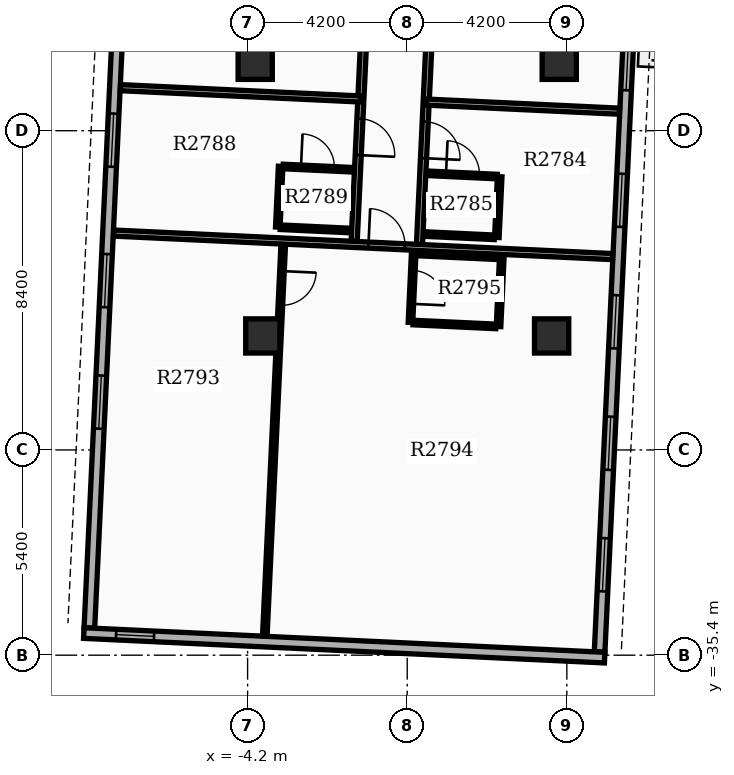
"""IFC4 building model, lengths in metres.
Left out: names, types, materials, properties, quantities, classifications, styles, units other than length and angle.
Written with IfcOpenShell. Run it as: python <this file> out.ifc"""

import sys

from ifc_helpers import new_model, si_unit, direction, frame, frame_2d, origin, origin_2d, place, context, subcontext, project, spatial, rectangle, extrude, element, fill, save


model = new_model("IFC4")
c1 = context("Model", 3, precision=1e-05, world=origin(), true_north=direction((0.0, 1.0)))
c2 = subcontext(c1, "Body", "Model", "MODEL_VIEW")
j1 = project(units=[si_unit("LENGTHUNIT", "METRE"), si_unit("PLANEANGLEUNIT", "RADIAN")], contexts=[c1])
p1 = place(None, origin())
s1 = spatial("IfcSite", under=j1, at=p1, CompositionType="ELEMENT")
p2 = place(p1, origin())
s2 = spatial("IfcBuilding", under=s1, at=p2, CompositionType="ELEMENT")
p3 = place(p2, frame((0.0, 0.0, 172.2)))
s3 = spatial("IfcBuildingStorey", under=s2, at=p3, CompositionType="ELEMENT", Elevation=172.2)
for number, where, z_axis, x_axis in (
    (1, (-4.0, -19.8, 0.0), (0.0, 0.0, 1.0), (1.0, 0.0, 0.0)),
    (2, (4.0, -19.8, 0.0), (0.0, 0.0, 1.0), (1.0, 0.0, 0.0)),
    (3, (-3.8, -27.0, 0.0), (0.0, 0.0, 1.0), (1.0, 0.0, 0.0)),
    (4, (3.8, -27.0, 0.0), (0.0, 0.0, 1.0), (1.0, 0.0, 0.0)),
):
    element("IfcColumn", number, at=place(p3, frame(where, z_axis=z_axis, x_axis=x_axis)), inside=s3, PredefinedType="COLUMN", context=c2, shape_type="SweptSolid", body=[
        extrude(rectangle(XDim=0.9, YDim=0.9, at=origin_2d()), origin(), (0.0, 0.0, 1.0), 3.9),
    ])
p4 = place(p3, frame((-7.416, -14.607, 0.0), z_axis=(0.0, 0.0, 1.0), x_axis=(-0.047103473814, -0.998890015344, 0.0)))
e5 = element("IfcWall", 5, at=p4, inside=s3, PredefinedType="STANDARD", context=c2, shape_type="SweptSolid", body=[
    extrude(rectangle(XDim=20.1, YDim=0.28, at=frame_2d((10.05, 0.0))), origin(), (0.0, 0.0, 1.0), 2.97),
])
p5 = place(p4, frame((1.6, 0.0, 0.8)))
e6 = element("IfcOpeningElement", 6, at=p5, cuts=e5, PredefinedType="OPENING", context=c2, shape_type="SweptSolid", body=[
    extrude(rectangle(XDim=1.4, YDim=1.6, at=frame_2d((0.7, 0.8))), frame((0.0, 0.15, 0.0), z_axis=(0.0, -1.0, 0.0), x_axis=(1.0, 0.0, 0.0)), (0.0, 0.0, 1.0), 0.3),
])
p6 = place(p4, frame((6.55, 0.0, 0.8)))
e7 = element("IfcOpeningElement", 7, at=p6, cuts=e5, PredefinedType="OPENING", context=c2, shape_type="SweptSolid", body=[
    extrude(rectangle(XDim=1.4, YDim=1.6, at=frame_2d((0.7, 0.8))), frame((0.0, 0.15, 0.0), z_axis=(0.0, -1.0, 0.0), x_axis=(1.0, 0.0, 0.0)), (0.0, 0.0, 1.0), 0.3),
])
p7 = place(p4, frame((10.25, 0.0, 0.8)))
e8 = element("IfcOpeningElement", 8, at=p7, cuts=e5, PredefinedType="OPENING", context=c2, shape_type="SweptSolid", body=[
    extrude(rectangle(XDim=1.4, YDim=1.6, at=frame_2d((0.7, 0.8))), frame((0.0, 0.15, 0.0), z_axis=(0.0, -1.0, 0.0), x_axis=(1.0, 0.0, 0.0)), (0.0, 0.0, 1.0), 0.3),
])
p8 = place(p4, frame((13.45, 0.0, 0.8)))
e9 = element("IfcOpeningElement", 9, at=p8, cuts=e5, PredefinedType="OPENING", context=c2, shape_type="SweptSolid", body=[
    extrude(rectangle(XDim=1.4, YDim=1.6, at=frame_2d((0.7, 0.8))), frame((0.0, 0.15, 0.0), z_axis=(0.0, -1.0, 0.0), x_axis=(1.0, 0.0, 0.0)), (0.0, 0.0, 1.0), 0.3),
])
p9 = place(p3, frame((5.062, -35.318, 0.0), z_axis=(0.0, 0.0, 1.0), x_axis=(0.047103473814, 0.998890015344, 0.0)))
e10 = element("IfcWall", 10, at=p9, inside=s3, PredefinedType="STANDARD", context=c2, shape_type="SweptSolid", body=[
    extrude(rectangle(XDim=20.1, YDim=0.28, at=frame_2d((10.05, 0.0))), origin(), (0.0, 0.0, 1.0), 2.97),
])
p10 = place(p9, frame((1.6, 0.0, 0.8)))
e11 = element("IfcOpeningElement", 11, at=p10, cuts=e10, PredefinedType="OPENING", context=c2, shape_type="SweptSolid", body=[
    extrude(rectangle(XDim=1.4, YDim=1.6, at=frame_2d((0.7, 0.8))), frame((0.0, 0.15, 0.0), z_axis=(0.0, -1.0, 0.0), x_axis=(1.0, 0.0, 0.0)), (0.0, 0.0, 1.0), 0.3),
])
p11 = place(p9, frame((4.8, 0.0, 0.8)))
e12 = element("IfcOpeningElement", 12, at=p11, cuts=e10, PredefinedType="OPENING", context=c2, shape_type="SweptSolid", body=[
    extrude(rectangle(XDim=1.4, YDim=1.6, at=frame_2d((0.7, 0.8))), frame((0.0, 0.15, 0.0), z_axis=(0.0, -1.0, 0.0), x_axis=(1.0, 0.0, 0.0)), (0.0, 0.0, 1.0), 0.3),
])
p12 = place(p9, frame((8.0, 0.0, 0.8)))
e13 = element("IfcOpeningElement", 13, at=p12, cuts=e10, PredefinedType="OPENING", context=c2, shape_type="SweptSolid", body=[
    extrude(rectangle(XDim=1.4, YDim=1.6, at=frame_2d((0.7, 0.8))), frame((0.0, 0.15, 0.0), z_axis=(0.0, -1.0, 0.0), x_axis=(1.0, 0.0, 0.0)), (0.0, 0.0, 1.0), 0.3),
])
p13 = place(p9, frame((11.2, 0.0, 0.8)))
e14 = element("IfcOpeningElement", 14, at=p13, cuts=e10, PredefinedType="OPENING", context=c2, shape_type="SweptSolid", body=[
    extrude(rectangle(XDim=1.4, YDim=1.6, at=frame_2d((0.7, 0.8))), frame((0.0, 0.15, 0.0), z_axis=(0.0, -1.0, 0.0), x_axis=(1.0, 0.0, 0.0)), (0.0, 0.0, 1.0), 0.3),
])
p14 = place(p9, frame((14.799, 0.0, 0.85)))
e15 = element("IfcOpeningElement", 15, at=p14, cuts=e10, PredefinedType="OPENING", context=c2, shape_type="SweptSolid", body=[
    extrude(rectangle(XDim=1.2, YDim=1.6, at=frame_2d((0.6, 0.8))), frame((0.0, 0.15, 0.0), z_axis=(0.0, -1.0, 0.0), x_axis=(1.0, 0.0, 0.0)), (0.0, 0.0, 1.0), 0.3),
])
p15 = place(p3, frame((-8.51, -34.818, 0.0), z_axis=(0.0, 0.0, 1.0), x_axis=(0.998890092147, -0.047101845086, 0.0)))
e16 = element("IfcWall", 16, at=p15, inside=s3, PredefinedType="STANDARD", context=c2, shape_type="SweptSolid", body=[
    extrude(rectangle(XDim=13.72, YDim=0.28, at=frame_2d((6.86, 0.0))), origin(), (0.0, 0.0, 1.0), 2.97),
])
p16 = place(p15, frame((0.85, 0.0, 0.85)))
e17 = element("IfcOpeningElement", 17, at=p16, cuts=e16, PredefinedType="OPENING", context=c2, shape_type="SweptSolid", body=[
    extrude(rectangle(XDim=1.0, YDim=1.5, at=frame_2d((0.5, 0.75))), frame((0.0, 0.15, 0.0), z_axis=(0.0, -1.0, 0.0), x_axis=(1.0, 0.0, 0.0)), (0.0, 0.0, 1.0), 0.3),
])
p17 = place(p3, frame((0.779, -14.903, 0.0), z_axis=(0.0, 0.0, 1.0), x_axis=(-0.047091598416, -0.998890575268, 0.0)))
e18 = element("IfcWall", 18, at=p17, inside=s3, PredefinedType="PARTITIONING", context=c2, shape_type="SweptSolid", body=[
    extrude(rectangle(XDim=9.7, YDim=0.16, at=frame_2d((4.85, 0.0))), origin(), (0.0, 0.0, 1.0), 2.96),
])
p18 = place(p17, frame((2.575, 0.0, 0.0)))
e19 = element("IfcOpeningElement", 19, at=p18, cuts=e18, PredefinedType="OPENING", context=c2, shape_type="SweptSolid", body=[
    extrude(rectangle(XDim=0.96, YDim=2.15, at=frame_2d((0.48, 1.075))), frame((0.0, 0.09, 0.0), z_axis=(0.0, -1.0, 0.0), x_axis=(1.0, 0.0, 0.0)), (0.0, 0.0, 1.0), 0.18),
])
p19 = place(p17, frame((6.467, 0.0, 0.0)))
e20 = element("IfcOpeningElement", 20, at=p19, cuts=e18, PredefinedType="OPENING", context=c2, shape_type="SweptSolid", body=[
    extrude(rectangle(XDim=0.96, YDim=2.15, at=frame_2d((0.48, 1.075))), frame((0.0, 0.09, 0.0), z_axis=(0.0, -1.0, 0.0), x_axis=(1.0, 0.0, 0.0)), (0.0, 0.0, 1.0), 0.18),
])
p20 = place(p3, frame((0.499, -20.847, 0.0), z_axis=(0.0, 0.0, 1.0), x_axis=(0.998891017342, -0.047082220362, 0.0)))
e21 = element("IfcWall", 21, at=p20, inside=s3, PredefinedType="PARTITIONING", context=c2, shape_type="SweptSolid", body=[
    extrude(rectangle(XDim=5.092, YDim=0.16, at=frame_2d((2.546, 0.0))), origin(), (0.0, 0.0, 1.0), 2.96),
])
p21 = place(p3, frame((0.55, -22.721, 0.0), z_axis=(0.0, 0.0, 1.0), x_axis=(0.998891083954, -0.047080807099, 0.0)))
e22 = element("IfcWall", 22, at=p21, inside=s3, PredefinedType="PARTITIONING", context=c2, shape_type="SweptSolid", body=[
    extrude(rectangle(XDim=1.82, YDim=0.12, at=frame_2d((0.91, 0.0))), origin(), (0.0, 0.0, 1.0), 2.96),
])
p22 = place(p21, frame((0.47, 0.0, 0.0)))
e23 = element("IfcOpeningElement", 23, at=p22, cuts=e22, PredefinedType="OPENING", context=c2, shape_type="SweptSolid", body=[
    extrude(rectangle(XDim=0.88, YDim=2.1, at=frame_2d((0.44, 1.05))), frame((0.0, 0.07, 0.0), z_axis=(0.0, -1.0, 0.0), x_axis=(1.0, 0.0, 0.0)), (0.0, 0.0, 1.0), 0.14),
])
p23 = place(p3, frame((0.475, -24.319, 0.0), z_axis=(0.0, 0.0, 1.0), x_axis=(0.998891083954, -0.047080807099, 0.0)))
e24 = element("IfcWall", 24, at=p23, inside=s3, PredefinedType="PARTITIONING", context=c2, shape_type="SweptSolid", body=[
    extrude(rectangle(XDim=1.82, YDim=0.12, at=frame_2d((0.91, 0.0))), origin(), (0.0, 0.0, 1.0), 2.96),
])
p24 = place(p3, frame((2.433, -22.81, 0.0), z_axis=(0.0, 0.0, 1.0), x_axis=(-0.046992475174, -0.998895243395, 0.0)))
e25 = element("IfcWall", 25, at=p24, inside=s3, PredefinedType="PARTITIONING", context=c2, shape_type="SweptSolid", body=[
    extrude(rectangle(XDim=1.6, YDim=0.12, at=frame_2d((0.8, 0.0))), origin(), (0.0, 0.0, 1.0), 2.96),
])
p25 = place(p3, frame((-0.939, -14.822, 0.0), z_axis=(0.0, 0.0, 1.0), x_axis=(-0.047116711769, -0.99888939101, 0.0)))
e26 = element("IfcWall", 26, at=p25, inside=s3, PredefinedType="PARTITIONING", context=c2, shape_type="SweptSolid", body=[
    extrude(rectangle(XDim=9.7, YDim=0.16, at=frame_2d((4.85, 0.0))), origin(), (0.0, 0.0, 1.0), 2.96),
])
p26 = place(p25, frame((2.575, 0.0, 0.0)))
e27 = element("IfcOpeningElement", 27, at=p26, cuts=e26, PredefinedType="OPENING", context=c2, shape_type="SweptSolid", body=[
    extrude(rectangle(XDim=0.96, YDim=2.15, at=frame_2d((0.48, 1.075))), frame((0.0, 0.09, 0.0), z_axis=(0.0, -1.0, 0.0), x_axis=(1.0, 0.0, 0.0)), (0.0, 0.0, 1.0), 0.18),
])
p27 = place(p25, frame((6.467, 0.0, 0.0)))
e28 = element("IfcOpeningElement", 28, at=p27, cuts=e26, PredefinedType="OPENING", context=c2, shape_type="SweptSolid", body=[
    extrude(rectangle(XDim=0.96, YDim=2.15, at=frame_2d((0.48, 1.075))), frame((0.0, 0.09, 0.0), z_axis=(0.0, -1.0, 0.0), x_axis=(1.0, 0.0, 0.0)), (0.0, 0.0, 1.0), 0.18),
])
p28 = place(p3, frame((-1.219, -20.766, 0.0), z_axis=(0.0, 0.0, 1.0), x_axis=(-0.998889408842, 0.047116333717, 0.0)))
e29 = element("IfcWall", 29, at=p28, inside=s3, PredefinedType="PARTITIONING", context=c2, shape_type="SweptSolid", body=[
    extrude(rectangle(XDim=6.332, YDim=0.16, at=frame_2d((3.166, 0.0))), origin(), (0.0, 0.0, 1.0), 2.96),
])
p29 = place(p3, frame((-3.265, -22.541, 0.0), z_axis=(0.0, 0.0, 1.0), x_axis=(0.998890786574, -0.047087116047, 0.0)))
e30 = element("IfcWall", 30, at=p29, inside=s3, PredefinedType="PARTITIONING", context=c2, shape_type="SweptSolid", body=[
    extrude(rectangle(XDim=1.82, YDim=0.12, at=frame_2d((0.91, 0.0))), origin(), (0.0, 0.0, 1.0), 2.96),
])
p30 = place(p29, frame((0.47, 0.0, 0.0)))
e31 = element("IfcOpeningElement", 31, at=p30, cuts=e30, PredefinedType="OPENING", context=c2, shape_type="SweptSolid", body=[
    extrude(rectangle(XDim=0.88, YDim=2.1, at=frame_2d((0.44, 1.05))), frame((0.0, 0.07, 0.0), z_axis=(0.0, -1.0, 0.0), x_axis=(1.0, 0.0, 0.0)), (0.0, 0.0, 1.0), 0.14),
])
p31 = place(p3, frame((-3.341, -24.139, 0.0), z_axis=(0.0, 0.0, 1.0), x_axis=(0.998890786574, -0.047087116047, 0.0)))
e32 = element("IfcWall", 32, at=p31, inside=s3, PredefinedType="PARTITIONING", context=c2, shape_type="SweptSolid", body=[
    extrude(rectangle(XDim=1.82, YDim=0.12, at=frame_2d((0.91, 0.0))), origin(), (0.0, 0.0, 1.0), 2.96),
])
p32 = place(p3, frame((-3.33, -22.538, 0.0), z_axis=(0.0, 0.0, 1.0), x_axis=(-0.047144709581, -0.998888069985, 0.0)))
e33 = element("IfcWall", 33, at=p32, inside=s3, PredefinedType="PARTITIONING", context=c2, shape_type="SweptSolid", body=[
    extrude(rectangle(XDim=1.6, YDim=0.12, at=frame_2d((0.8, 0.0))), origin(), (0.0, 0.0, 1.0), 2.96),
])
p33 = place(p3, frame((-7.725, -24.293, 0.0), z_axis=(0.0, 0.0, 1.0), x_axis=(0.998889967692, -0.047104484326, 0.0)))
e34 = element("IfcWall", 34, at=p33, inside=s3, PredefinedType="PARTITIONING", context=c2, shape_type="SweptSolid", body=[
    extrude(rectangle(XDim=13.144, YDim=0.16, at=frame_2d((6.572, 0.0))), origin(), (0.0, 0.0, 1.0), 2.96),
])
p34 = place(p33, frame((6.712, 0.0, 0.0)))
e35 = element("IfcOpeningElement", 35, at=p34, cuts=e34, PredefinedType="OPENING", context=c2, shape_type="SweptSolid", body=[
    extrude(rectangle(XDim=0.96, YDim=2.15, at=frame_2d((0.48, 1.075))), frame((0.0, 0.09, 0.0), z_axis=(0.0, -1.0, 0.0), x_axis=(1.0, 0.0, 0.0)), (0.0, 0.0, 1.0), 0.18),
])
p35 = place(p3, frame((-3.262, -24.594, 0.0), z_axis=(0.0, 0.0, 1.0), x_axis=(-0.047089343138, -0.998890681588, 0.0)))
e36 = element("IfcWall", 36, at=p35, inside=s3, PredefinedType="PARTITIONING", context=c2, shape_type="SweptSolid", body=[
    extrude(rectangle(XDim=10.312, YDim=0.12, at=frame_2d((5.156, 0.0))), origin(), (0.0, 0.0, 1.0), 2.96),
])
p36 = place(p35, frame((0.7, 0.0, 0.0)))
e37 = element("IfcOpeningElement", 37, at=p36, cuts=e36, PredefinedType="OPENING", context=c2, shape_type="SweptSolid", body=[
    extrude(rectangle(XDim=0.9, YDim=2.1, at=frame_2d((0.45, 1.05))), frame((0.0, 0.07, 0.0), z_axis=(0.0, -1.0, 0.0), x_axis=(1.0, 0.0, 0.0)), (0.0, 0.0, 1.0), 0.14),
])
p37 = place(p3, frame((0.171, -24.826, 0.0), z_axis=(0.0, 0.0, 1.0), x_axis=(-0.047087116047, -0.998890786574, 0.0)))
e38 = element("IfcWall", 38, at=p37, inside=s3, PredefinedType="PARTITIONING", context=c2, shape_type="SweptSolid", body=[
    extrude(rectangle(XDim=1.82, YDim=0.12, at=frame_2d((0.91, 0.0))), origin(), (0.0, 0.0, 1.0), 2.96),
])
p38 = place(p37, frame((0.45, 0.0, 0.0)))
e39 = element("IfcOpeningElement", 39, at=p38, cuts=e38, PredefinedType="OPENING", context=c2, shape_type="SweptSolid", body=[
    extrude(rectangle(XDim=0.88, YDim=2.1, at=frame_2d((0.44, 1.05))), frame((0.0, 0.07, 0.0), z_axis=(0.0, -1.0, 0.0), x_axis=(1.0, 0.0, 0.0)), (0.0, 0.0, 1.0), 0.14),
])
p39 = place(p3, frame((2.488, -24.935, 0.0), z_axis=(0.0, 0.0, 1.0), x_axis=(-0.047214641863, -0.998884766924, 0.0)))
e40 = element("IfcWall", 40, at=p39, inside=s3, PredefinedType="PARTITIONING", context=c2, shape_type="SweptSolid", body=[
    extrude(rectangle(XDim=1.82, YDim=0.12, at=frame_2d((0.91, 0.0))), origin(), (0.0, 0.0, 1.0), 2.96),
])
p40 = place(p3, frame((0.241, -24.829, 0.0), z_axis=(0.0, 0.0, 1.0), x_axis=(0.998887815408, -0.047150103183, 0.0)))
e41 = element("IfcWall", 41, at=p40, inside=s3, PredefinedType="PARTITIONING", context=c2, shape_type="SweptSolid", body=[
    extrude(rectangle(XDim=2.18, YDim=0.12, at=frame_2d((1.09, 0.0))), origin(), (0.0, 0.0, 1.0), 2.96),
])
p41 = place(p3, frame((0.155, -26.647, 0.0), z_axis=(0.0, 0.0, 1.0), x_axis=(0.998893331673, -0.047033094092, 0.0)))
e42 = element("IfcWall", 42, at=p41, inside=s3, PredefinedType="PARTITIONING", context=c2, shape_type="SweptSolid", body=[
    extrude(rectangle(XDim=2.18, YDim=0.12, at=frame_2d((1.09, 0.0))), origin(), (0.0, 0.0, 1.0), 2.96),
])
p42 = place(p6, origin())
e43 = element("IfcWindow", 43, at=p42, inside=s3, PartitioningType="SINGLE_PANEL", PredefinedType="WINDOW", context=c2, shape_type="SweptSolid", body=[
    extrude(rectangle(XDim=1.4, YDim=1.6, at=frame_2d((0.7, 0.8))), frame((0.0, 0.03, 0.0), z_axis=(0.0, -1.0, 0.0), x_axis=(1.0, 0.0, 0.0)), (0.0, 0.0, 1.0), 0.06),
])
fill(e7, e43)
p43 = place(p7, origin())
e44 = element("IfcWindow", 44, at=p43, inside=s3, PartitioningType="SINGLE_PANEL", PredefinedType="WINDOW", context=c2, shape_type="SweptSolid", body=[
    extrude(rectangle(XDim=1.4, YDim=1.6, at=frame_2d((0.7, 0.8))), frame((0.0, 0.03, 0.0), z_axis=(0.0, -1.0, 0.0), x_axis=(1.0, 0.0, 0.0)), (0.0, 0.0, 1.0), 0.06),
])
fill(e8, e44)
p44 = place(p8, origin())
e45 = element("IfcWindow", 45, at=p44, inside=s3, PartitioningType="SINGLE_PANEL", PredefinedType="WINDOW", context=c2, shape_type="SweptSolid", body=[
    extrude(rectangle(XDim=1.4, YDim=1.6, at=frame_2d((0.7, 0.8))), frame((0.0, 0.03, 0.0), z_axis=(0.0, -1.0, 0.0), x_axis=(1.0, 0.0, 0.0)), (0.0, 0.0, 1.0), 0.06),
])
fill(e9, e45)
p45 = place(p10, origin())
e46 = element("IfcWindow", 46, at=p45, inside=s3, PartitioningType="SINGLE_PANEL", PredefinedType="WINDOW", context=c2, shape_type="SweptSolid", body=[
    extrude(rectangle(XDim=1.4, YDim=1.6, at=frame_2d((0.7, 0.8))), frame((0.0, 0.03, 0.0), z_axis=(0.0, -1.0, 0.0), x_axis=(1.0, 0.0, 0.0)), (0.0, 0.0, 1.0), 0.06),
])
fill(e11, e46)
p46 = place(p11, origin())
e47 = element("IfcWindow", 47, at=p46, inside=s3, PartitioningType="SINGLE_PANEL", PredefinedType="WINDOW", context=c2, shape_type="SweptSolid", body=[
    extrude(rectangle(XDim=1.4, YDim=1.6, at=frame_2d((0.7, 0.8))), frame((0.0, 0.03, 0.0), z_axis=(0.0, -1.0, 0.0), x_axis=(1.0, 0.0, 0.0)), (0.0, 0.0, 1.0), 0.06),
])
fill(e12, e47)
p47 = place(p12, origin())
e48 = element("IfcWindow", 48, at=p47, inside=s3, PartitioningType="SINGLE_PANEL", PredefinedType="WINDOW", context=c2, shape_type="SweptSolid", body=[
    extrude(rectangle(XDim=1.4, YDim=1.6, at=frame_2d((0.7, 0.8))), frame((0.0, 0.03, 0.0), z_axis=(0.0, -1.0, 0.0), x_axis=(1.0, 0.0, 0.0)), (0.0, 0.0, 1.0), 0.06),
])
fill(e13, e48)
p48 = place(p13, origin())
e49 = element("IfcWindow", 49, at=p48, inside=s3, PartitioningType="SINGLE_PANEL", PredefinedType="WINDOW", context=c2, shape_type="SweptSolid", body=[
    extrude(rectangle(XDim=1.4, YDim=1.6, at=frame_2d((0.7, 0.8))), frame((0.0, 0.03, 0.0), z_axis=(0.0, -1.0, 0.0), x_axis=(1.0, 0.0, 0.0)), (0.0, 0.0, 1.0), 0.06),
])
fill(e14, e49)
p49 = place(p16, origin())
e50 = element("IfcWindow", 50, at=p49, inside=s3, PartitioningType="SINGLE_PANEL", PredefinedType="WINDOW", context=c2, shape_type="SweptSolid", body=[
    extrude(rectangle(XDim=1.0, YDim=1.5, at=frame_2d((0.5, 0.75))), frame((0.0, 0.03, 0.0), z_axis=(0.0, -1.0, 0.0), x_axis=(1.0, 0.0, 0.0)), (0.0, 0.0, 1.0), 0.06),
])
fill(e17, e50)
p50 = place(p14, origin())
e51 = element("IfcWindow", 51, at=p50, inside=s3, PartitioningType="SINGLE_PANEL", PredefinedType="WINDOW", context=c2, shape_type="SweptSolid", body=[
    extrude(rectangle(XDim=1.2, YDim=1.6, at=frame_2d((0.6, 0.8))), frame((0.0, 0.03, 0.0), z_axis=(0.0, -1.0, 0.0), x_axis=(1.0, 0.0, 0.0)), (0.0, 0.0, 1.0), 0.06),
])
fill(e15, e51)
p51 = place(p19, origin())
e52 = element("IfcDoor", 52, at=p51, inside=s3, OperationType="SINGLE_SWING_RIGHT", PredefinedType="DOOR", context=c2, shape_type="SweptSolid", body=[
    extrude(rectangle(XDim=0.96, YDim=2.15, at=frame_2d((0.48, 1.075))), frame((0.0, 0.025, 0.0), z_axis=(0.0, -1.0, 0.0), x_axis=(1.0, 0.0, 0.0)), (0.0, 0.0, 1.0), 0.05),
])
fill(e20, e52)
p52 = place(p22, origin())
e53 = element("IfcDoor", 53, at=p52, inside=s3, OperationType="SINGLE_SWING_LEFT", PredefinedType="DOOR", context=c2, shape_type="SweptSolid", body=[
    extrude(rectangle(XDim=0.88, YDim=2.1, at=frame_2d((0.44, 1.05))), frame((0.0, 0.025, 0.0), z_axis=(0.0, -1.0, 0.0), x_axis=(1.0, 0.0, 0.0)), (0.0, 0.0, 1.0), 0.05),
])
fill(e23, e53)
p53 = place(p27, origin())
e54 = element("IfcDoor", 54, at=p53, inside=s3, OperationType="SINGLE_SWING_RIGHT", PredefinedType="DOOR", context=c2, shape_type="SweptSolid", body=[
    extrude(rectangle(XDim=0.96, YDim=2.15, at=frame_2d((0.48, 1.075))), frame((0.0, 0.025, 0.0), z_axis=(0.0, -1.0, 0.0), x_axis=(1.0, 0.0, 0.0)), (0.0, 0.0, 1.0), 0.05),
])
fill(e28, e54)
p54 = place(p30, origin())
e55 = element("IfcDoor", 55, at=p54, inside=s3, OperationType="SINGLE_SWING_LEFT", PredefinedType="DOOR", context=c2, shape_type="SweptSolid", body=[
    extrude(rectangle(XDim=0.88, YDim=2.1, at=frame_2d((0.44, 1.05))), frame((0.0, 0.025, 0.0), z_axis=(0.0, -1.0, 0.0), x_axis=(1.0, 0.0, 0.0)), (0.0, 0.0, 1.0), 0.05),
])
fill(e31, e55)
p55 = place(p34, origin())
e56 = element("IfcDoor", 56, at=p55, inside=s3, OperationType="SINGLE_SWING_LEFT", PredefinedType="DOOR", context=c2, shape_type="SweptSolid", body=[
    extrude(rectangle(XDim=0.96, YDim=2.15, at=frame_2d((0.48, 1.075))), frame((0.0, 0.025, 0.0), z_axis=(0.0, -1.0, 0.0), x_axis=(1.0, 0.0, 0.0)), (0.0, 0.0, 1.0), 0.05),
])
fill(e35, e56)
p56 = place(p36, origin())
e57 = element("IfcDoor", 57, at=p56, inside=s3, OperationType="SINGLE_SWING_LEFT", PredefinedType="DOOR", context=c2, shape_type="SweptSolid", body=[
    extrude(rectangle(XDim=0.9, YDim=2.1, at=frame_2d((0.45, 1.05))), frame((0.0, 0.025, 0.0), z_axis=(0.0, -1.0, 0.0), x_axis=(1.0, 0.0, 0.0)), (0.0, 0.0, 1.0), 0.05),
])
fill(e37, e57)
p57 = place(p38, origin())
e58 = element("IfcDoor", 58, at=p57, inside=s3, OperationType="SINGLE_SWING_RIGHT", PredefinedType="DOOR", context=c2, shape_type="SweptSolid", body=[
    extrude(rectangle(XDim=0.88, YDim=2.1, at=frame_2d((0.44, 1.05))), frame((0.0, 0.025, 0.0), z_axis=(0.0, -1.0, 0.0), x_axis=(1.0, 0.0, 0.0)), (0.0, 0.0, 1.0), 0.05),
])
fill(e39, e58)
save(model, sys.argv[1])
